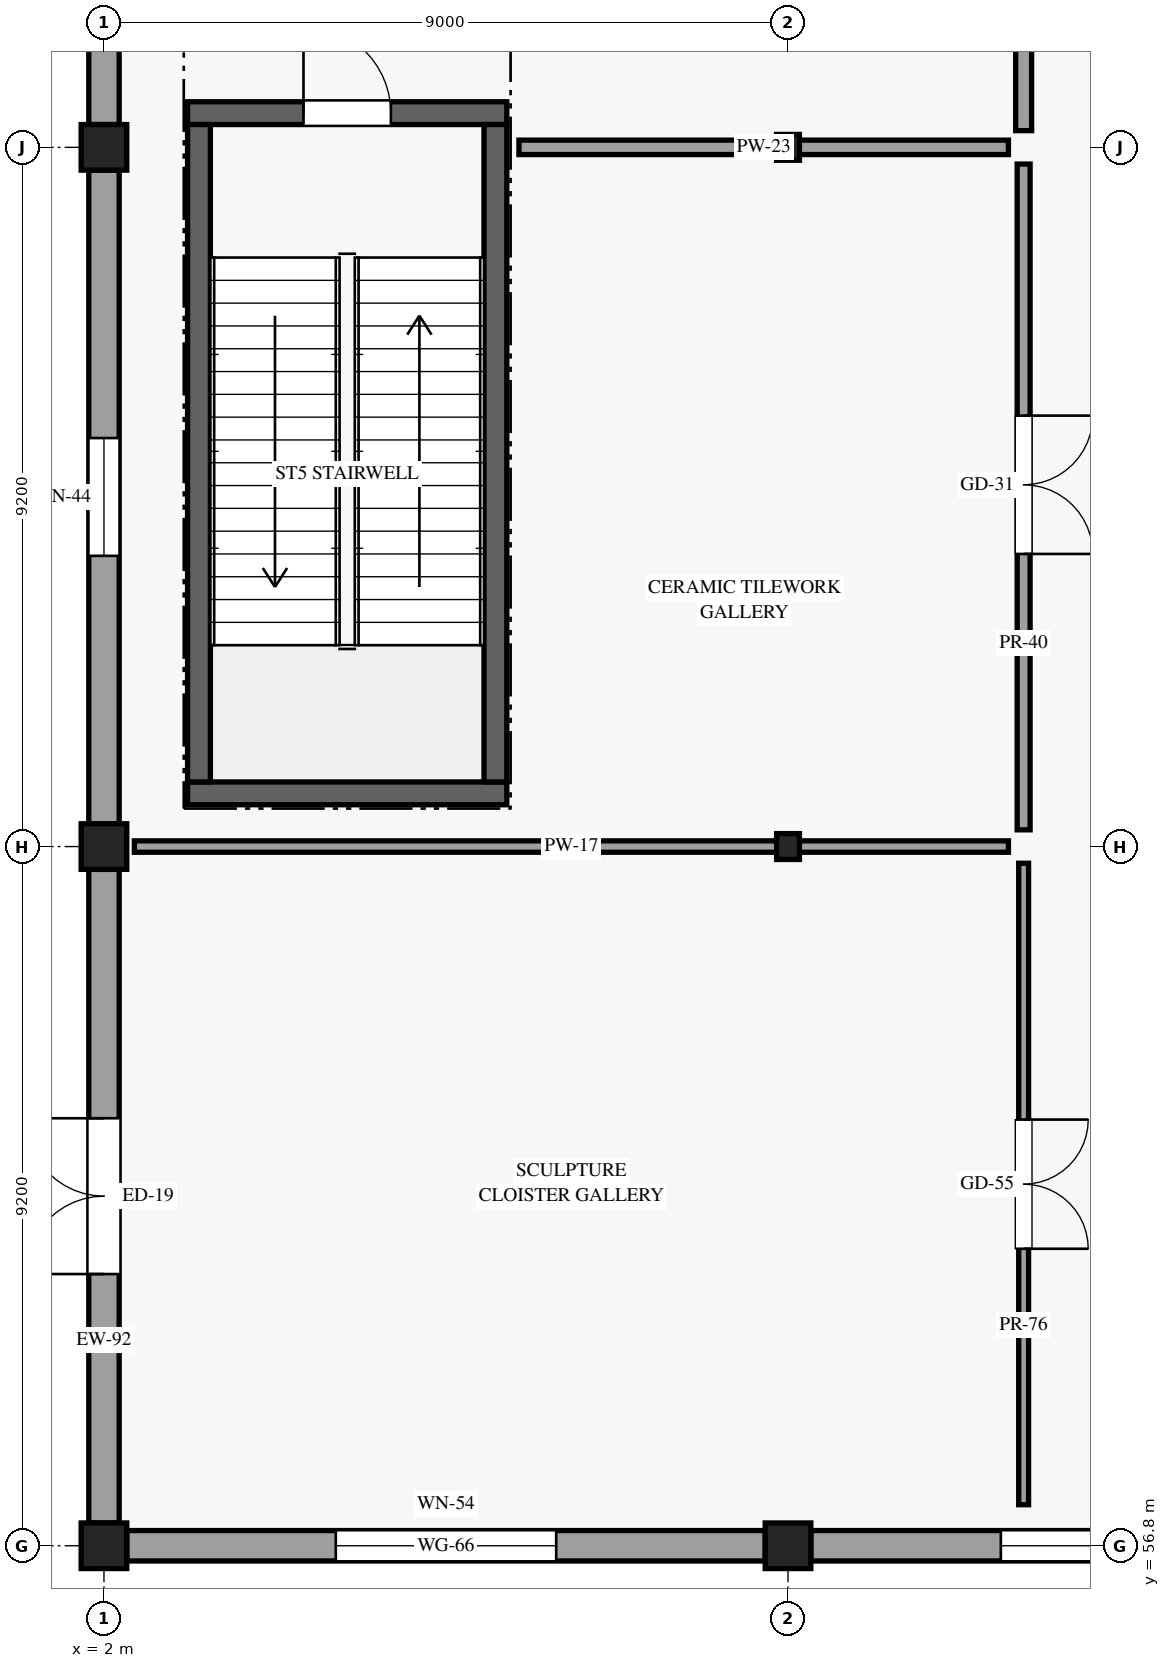
"""IFC4 building model, lengths in metres.
Left out: names, types, materials, properties, quantities, classifications, styles, units other than length and angle.
Written with IfcOpenShell. Run it as: python <this file> out.ifc"""

import sys

from ifc_helpers import new_model, si_unit, direction, frame, frame_2d, origin, origin_2d, place, context, subcontext, project, spatial, rectangle, i_section, extrude, element, fill, save


model = new_model("IFC4")
c1 = context("Model", 3, precision=1e-05, world=origin(), true_north=direction((0.0, 1.0)))
c2 = subcontext(c1, "Body", "Model", "MODEL_VIEW")
j1 = project(units=[si_unit("LENGTHUNIT", "METRE"), si_unit("PLANEANGLEUNIT", "RADIAN")], contexts=[c1])
p1 = place(None, origin())
s1 = spatial("IfcSite", under=j1, at=p1, CompositionType="ELEMENT")
p2 = place(p1, origin())
s2 = spatial("IfcBuilding", under=s1, at=p2, CompositionType="ELEMENT")
p3 = place(p2, origin())
s3 = spatial("IfcBuildingStorey", under=s2, at=p3, CompositionType="ELEMENT", Elevation=0.0)
for number, where, z_axis, x_axis in (
    (1, (2.0, 56.8, 0.0), (0.0, 0.0, 1.0), (1.0, 0.0, 0.0)),
    (2, (2.0, 66.0, 0.0), (0.0, 0.0, 1.0), (1.0, 0.0, 0.0)),
    (3, (2.0, 75.2, 0.0), (0.0, 0.0, 1.0), (1.0, 0.0, 0.0)),
    (4, (11.0, 56.8, 0.0), (0.0, 0.0, 1.0), (1.0, 0.0, 0.0)),
):
    element("IfcColumn", number, at=place(p3, frame(where, z_axis=z_axis, x_axis=x_axis)), inside=s3, PredefinedType="COLUMN", context=c2, shape_type="SweptSolid", body=[
        extrude(rectangle(XDim=0.6, YDim=0.6, at=origin_2d()), origin(), (0.0, 0.0, 1.0), 5.4),
    ])
for number, where, z_axis, x_axis in (
    (5, (11.0, 66.0, 0.0), (0.0, 0.0, 1.0), (1.0, 0.0, 0.0)),
    (6, (11.0, 75.2, 0.0), (0.0, 0.0, 1.0), (1.0, 0.0, 0.0)),
):
    element("IfcColumn", number, at=place(p3, frame(where, z_axis=z_axis, x_axis=x_axis)), inside=s3, PredefinedType="COLUMN", context=c2, shape_type="SweptSolid", body=[
        extrude(i_section(OverallWidth=0.3, OverallDepth=0.34, WebThickness=0.012, FlangeThickness=0.021, FilletRadius=0.027, at=origin_2d()), origin(), (0.0, 0.0, 1.0), 5.4),
    ])
p4 = place(p3, frame((2.3, 56.8, 0.0), z_axis=(0.0, 0.0, 1.0), x_axis=(1.0, 0.0, 0.0)))
e7 = element("IfcWall", 7, at=p4, inside=s3, PredefinedType="STANDARD", context=c2, shape_type="SweptSolid", body=[
    extrude(rectangle(XDim=8.4, YDim=0.4, at=frame_2d((4.2, 0.0))), origin(), (0.0, 0.0, 1.0), 4.605),
])
p5 = place(p4, frame((5.65, 0.0, 0.85), z_axis=(0.0, 0.0, 1.0), x_axis=(-1.0, 0.0, 0.0)))
e8 = element("IfcOpeningElement", 8, at=p5, cuts=e7, PredefinedType="OPENING", context=c2, shape_type="SweptSolid", body=[
    extrude(rectangle(XDim=2.9, YDim=2.25, at=frame_2d((1.45, 1.125))), frame((0.0, 0.21, 0.0), z_axis=(0.0, -1.0, 0.0), x_axis=(1.0, 0.0, 0.0)), (0.0, 0.0, 1.0), 0.42),
])
p6 = place(p3, frame((11.3, 56.8, 0.0), z_axis=(0.0, 0.0, 1.0), x_axis=(1.0, 0.0, 0.0)))
e9 = element("IfcWall", 9, at=p6, inside=s3, PredefinedType="STANDARD", context=c2, shape_type="SweptSolid", body=[
    extrude(rectangle(XDim=8.4, YDim=0.4, at=frame_2d((4.2, 0.0))), origin(), (0.0, 0.0, 1.0), 4.605),
])
p7 = place(p6, frame((5.9, 0.0, 0.85), z_axis=(0.0, 0.0, 1.0), x_axis=(-1.0, 0.0, 0.0)))
e10 = element("IfcOpeningElement", 10, at=p7, cuts=e9, PredefinedType="OPENING", context=c2, shape_type="SweptSolid", body=[
    extrude(rectangle(XDim=3.4, YDim=2.4, at=frame_2d((1.7, 1.2))), frame((0.0, 0.21, 0.0), z_axis=(0.0, -1.0, 0.0), x_axis=(1.0, 0.0, 0.0)), (0.0, 0.0, 1.0), 0.42),
])
p8 = place(p3, frame((2.0, 57.1, 0.0), z_axis=(0.0, 0.0, 1.0), x_axis=(0.0, 1.0, 0.0)))
e11 = element("IfcWall", 11, at=p8, inside=s3, PredefinedType="STANDARD", context=c2, shape_type="SweptSolid", body=[
    extrude(rectangle(XDim=8.6, YDim=0.4, at=frame_2d((4.3, 0.0))), origin(), (0.0, 0.0, 1.0), 4.605),
])
p9 = place(p8, frame((3.275, 0.0, 0.0)))
e12 = element("IfcOpeningElement", 12, at=p9, cuts=e11, PredefinedType="OPENING", context=c2, shape_type="SweptSolid", body=[
    extrude(rectangle(XDim=2.05, YDim=2.45, at=frame_2d((1.025, 1.225))), frame((0.0, 0.21, 0.0), z_axis=(0.0, -1.0, 0.0), x_axis=(1.0, 0.0, 0.0)), (0.0, 0.0, 1.0), 0.42),
])
p10 = place(p3, frame((2.0, 66.3, 0.0), z_axis=(0.0, 0.0, 1.0), x_axis=(0.0, 1.0, 0.0)))
e13 = element("IfcWall", 13, at=p10, inside=s3, PredefinedType="STANDARD", context=c2, shape_type="SweptSolid", body=[
    extrude(rectangle(XDim=8.6, YDim=0.4, at=frame_2d((4.3, 0.0))), origin(), (0.0, 0.0, 1.0), 4.605),
])
p11 = place(p10, frame((3.525, 0.0, 0.85)))
e14 = element("IfcOpeningElement", 14, at=p11, cuts=e13, PredefinedType="OPENING", context=c2, shape_type="SweptSolid", body=[
    extrude(rectangle(XDim=1.55, YDim=1.95, at=frame_2d((0.775, 0.975))), frame((0.0, 0.21, 0.0), z_axis=(0.0, -1.0, 0.0), x_axis=(1.0, 0.0, 0.0)), (0.0, 0.0, 1.0), 0.42),
])
p12 = place(p3, frame((2.0, 75.5, 0.0), z_axis=(0.0, 0.0, 1.0), x_axis=(0.0, 1.0, 0.0)))
e15 = element("IfcWall", 15, at=p12, inside=s3, PredefinedType="STANDARD", context=c2, shape_type="SweptSolid", body=[
    extrude(rectangle(XDim=8.6, YDim=0.4, at=frame_2d((4.3, 0.0))), origin(), (0.0, 0.0, 1.0), 4.605),
])
p13 = place(p12, frame((3.425, 0.0, 0.85)))
e16 = element("IfcOpeningElement", 16, at=p13, cuts=e15, PredefinedType="OPENING", context=c2, shape_type="SweptSolid", body=[
    extrude(rectangle(XDim=1.75, YDim=2.05, at=frame_2d((0.875, 1.025))), frame((0.0, 0.21, 0.0), z_axis=(0.0, -1.0, 0.0), x_axis=(1.0, 0.0, 0.0)), (0.0, 0.0, 1.0), 0.42),
])
p14 = place(p3, frame((3.1, 75.65, 0.0), z_axis=(0.0, 0.0, 1.0), x_axis=(1.0, 0.0, 0.0)))
e17 = element("IfcWall", 17, at=p14, inside=s3, PredefinedType="SHEAR", context=c2, shape_type="SweptSolid", body=[
    extrude(rectangle(XDim=4.2, YDim=0.3, at=frame_2d((2.1, 0.0))), origin(), (0.0, 0.0, 1.0), 5.14),
])
p15 = place(p14, frame((1.525, 0.0, 0.0)))
e18 = element("IfcOpeningElement", 18, at=p15, cuts=e17, PredefinedType="OPENING", context=c2, shape_type="SweptSolid", body=[
    extrude(rectangle(XDim=1.15, YDim=2.2, at=frame_2d((0.575, 1.1))), frame((0.0, 0.16, 0.0), z_axis=(0.0, -1.0, 0.0), x_axis=(1.0, 0.0, 0.0)), (0.0, 0.0, 1.0), 0.32),
])
p16 = place(p3, frame((3.1, 66.7, 0.0), z_axis=(0.0, 0.0, 1.0), x_axis=(1.0, 0.0, 0.0)))
e19 = element("IfcWall", 19, at=p16, inside=s3, PredefinedType="SHEAR", context=c2, shape_type="SweptSolid", body=[
    extrude(rectangle(XDim=4.2, YDim=0.3, at=frame_2d((2.1, 0.0))), origin(), (0.0, 0.0, 1.0), 5.14),
])
for number, where, z_axis, x_axis in (
    (20, (3.25, 66.85, 0.0), (0.0, 0.0, 1.0), (0.0, 1.0, 0.0)),
    (21, (7.15, 66.85, 0.0), (0.0, 0.0, 1.0), (0.0, 1.0, 0.0)),
):
    element("IfcWall", number, at=place(p3, frame(where, z_axis=z_axis, x_axis=x_axis)), inside=s3, PredefinedType="SHEAR", context=c2, shape_type="SweptSolid", body=[
        extrude(rectangle(XDim=8.65, YDim=0.3, at=frame_2d((4.325, 0.0))), origin(), (0.0, 0.0, 1.0), 5.14),
    ])
p17 = place(p3, frame((14.1, 57.34, 0.0), z_axis=(0.0, 0.0, 1.0), x_axis=(0.0, 1.0, 0.0)))
e22 = element("IfcWall", 22, at=p17, inside=s3, PredefinedType="PARTITIONING", context=c2, shape_type="SweptSolid", body=[
    extrude(rectangle(XDim=8.44, YDim=0.13, at=frame_2d((4.22, 0.0))), origin(), (0.0, 0.0, 1.0), 4.605),
])
p18 = place(p17, frame((5.068, 0.0, 0.0), z_axis=(0.0, 0.0, 1.0), x_axis=(-1.0, 0.0, 0.0)))
e23 = element("IfcOpeningElement", 23, at=p18, cuts=e22, PredefinedType="OPENING", context=c2, shape_type="SweptSolid", body=[
    extrude(rectangle(XDim=1.7, YDim=2.44, at=frame_2d((0.85, 1.22))), frame((0.0, 0.075, 0.0), z_axis=(0.0, -1.0, 0.0), x_axis=(1.0, 0.0, 0.0)), (0.0, 0.0, 1.0), 0.15),
])
p19 = place(p3, frame((2.4, 66.0, 0.0), z_axis=(0.0, 0.0, 1.0), x_axis=(1.0, 0.0, 0.0)))
e24 = element("IfcWall", 24, at=p19, inside=s3, PredefinedType="PARTITIONING", context=c2, shape_type="SweptSolid", body=[
    extrude(rectangle(XDim=11.5, YDim=0.15, at=frame_2d((5.75, 0.0))), origin(), (0.0, 0.0, 1.0), 4.605),
])
p20 = place(p3, frame((14.1, 66.22, 0.0), z_axis=(0.0, 0.0, 1.0), x_axis=(0.0, 1.0, 0.0)))
e25 = element("IfcWall", 25, at=p20, inside=s3, PredefinedType="PARTITIONING", context=c2, shape_type="SweptSolid", body=[
    extrude(rectangle(XDim=8.76, YDim=0.17, at=frame_2d((4.38, 0.0))), origin(), (0.0, 0.0, 1.0), 4.605),
])
p21 = place(p20, frame((5.45, 0.0, 0.0), z_axis=(0.0, 0.0, 1.0), x_axis=(-1.0, 0.0, 0.0)))
e26 = element("IfcOpeningElement", 26, at=p21, cuts=e25, PredefinedType="OPENING", context=c2, shape_type="SweptSolid", body=[
    extrude(rectangle(XDim=1.82, YDim=2.46, at=frame_2d((0.91, 1.23))), frame((0.0, 0.095, 0.0), z_axis=(0.0, -1.0, 0.0), x_axis=(1.0, 0.0, 0.0)), (0.0, 0.0, 1.0), 0.19),
])
p22 = place(p3, frame((7.46, 75.2, 0.0), z_axis=(0.0, 0.0, 1.0), x_axis=(1.0, 0.0, 0.0)))
e27 = element("IfcWall", 27, at=p22, inside=s3, PredefinedType="PARTITIONING", context=c2, shape_type="SweptSolid", body=[
    extrude(rectangle(XDim=6.44, YDim=0.19, at=frame_2d((3.22, 0.0))), origin(), (0.0, 0.0, 1.0), 4.605),
])
p23 = place(p3, frame((14.1, 75.42, 0.0), z_axis=(0.0, 0.0, 1.0), x_axis=(0.0, 1.0, 0.0)))
e28 = element("IfcWall", 28, at=p23, inside=s3, PredefinedType="PARTITIONING", context=c2, shape_type="SweptSolid", body=[
    extrude(rectangle(XDim=8.76, YDim=0.21, at=frame_2d((4.38, 0.0))), origin(), (0.0, 0.0, 1.0), 4.605),
])
p24 = place(p23, frame((4.83, 0.0, 0.0), z_axis=(0.0, 0.0, 1.0), x_axis=(-1.0, 0.0, 0.0)))
e29 = element("IfcOpeningElement", 29, at=p24, cuts=e28, PredefinedType="OPENING", context=c2, shape_type="SweptSolid", body=[
    extrude(rectangle(XDim=0.95, YDim=2.15, at=frame_2d((0.475, 1.075))), frame((0.0, 0.115, 0.0), z_axis=(0.0, -1.0, 0.0), x_axis=(1.0, 0.0, 0.0)), (0.0, 0.0, 1.0), 0.23),
])
p25 = place(p5, origin())
e30 = element("IfcWindow", 30, at=p25, inside=s3, PartitioningType="SINGLE_PANEL", PredefinedType="WINDOW", context=c2, shape_type="SweptSolid", body=[
    extrude(rectangle(XDim=2.9, YDim=2.25, at=frame_2d((1.45, 1.125))), frame((0.0, 0.03, 0.0), z_axis=(0.0, -1.0, 0.0), x_axis=(1.0, 0.0, 0.0)), (0.0, 0.0, 1.0), 0.06),
])
fill(e8, e30)
p26 = place(p7, origin())
e31 = element("IfcWindow", 31, at=p26, inside=s3, PartitioningType="SINGLE_PANEL", PredefinedType="WINDOW", context=c2, shape_type="SweptSolid", body=[
    extrude(rectangle(XDim=3.4, YDim=2.4, at=frame_2d((1.7, 1.2))), frame((0.0, 0.03, 0.0), z_axis=(0.0, -1.0, 0.0), x_axis=(1.0, 0.0, 0.0)), (0.0, 0.0, 1.0), 0.06),
])
fill(e10, e31)
p27 = place(p9, origin())
e32 = element("IfcDoor", 32, at=p27, inside=s3, OperationType="DOUBLE_DOOR_SINGLE_SWING", PredefinedType="DOOR", context=c2, shape_type="SweptSolid", body=[
    extrude(rectangle(XDim=2.05, YDim=2.45, at=frame_2d((1.025, 1.225))), frame((0.0, 0.025, 0.0), z_axis=(0.0, -1.0, 0.0), x_axis=(1.0, 0.0, 0.0)), (0.0, 0.0, 1.0), 0.05),
])
fill(e12, e32)
p28 = place(p11, origin())
e33 = element("IfcWindow", 33, at=p28, inside=s3, PartitioningType="SINGLE_PANEL", PredefinedType="WINDOW", context=c2, shape_type="SweptSolid", body=[
    extrude(rectangle(XDim=1.55, YDim=1.95, at=frame_2d((0.775, 0.975))), frame((0.0, 0.03, 0.0), z_axis=(0.0, -1.0, 0.0), x_axis=(1.0, 0.0, 0.0)), (0.0, 0.0, 1.0), 0.06),
])
fill(e14, e33)
p29 = place(p15, origin())
e34 = element("IfcDoor", 34, at=p29, inside=s3, OperationType="SINGLE_SWING_LEFT", PredefinedType="DOOR", context=c2, shape_type="SweptSolid", body=[
    extrude(rectangle(XDim=1.15, YDim=2.2, at=frame_2d((0.575, 1.1))), frame((0.0, 0.025, 0.0), z_axis=(0.0, -1.0, 0.0), x_axis=(1.0, 0.0, 0.0)), (0.0, 0.0, 1.0), 0.05),
])
fill(e18, e34)
p30 = place(p18, origin())
e35 = element("IfcDoor", 35, at=p30, inside=s3, OperationType="DOUBLE_DOOR_SINGLE_SWING", PredefinedType="DOOR", context=c2, shape_type="SweptSolid", body=[
    extrude(rectangle(XDim=1.7, YDim=2.44, at=frame_2d((0.85, 1.22))), frame((0.0, 0.025, 0.0), z_axis=(0.0, -1.0, 0.0), x_axis=(1.0, 0.0, 0.0)), (0.0, 0.0, 1.0), 0.05),
])
fill(e23, e35)
p31 = place(p21, origin())
e36 = element("IfcDoor", 36, at=p31, inside=s3, OperationType="DOUBLE_DOOR_SINGLE_SWING", PredefinedType="DOOR", context=c2, shape_type="SweptSolid", body=[
    extrude(rectangle(XDim=1.82, YDim=2.46, at=frame_2d((0.91, 1.23))), frame((0.0, 0.025, 0.0), z_axis=(0.0, -1.0, 0.0), x_axis=(1.0, 0.0, 0.0)), (0.0, 0.0, 1.0), 0.05),
])
fill(e26, e36)
save(model, sys.argv[1])
